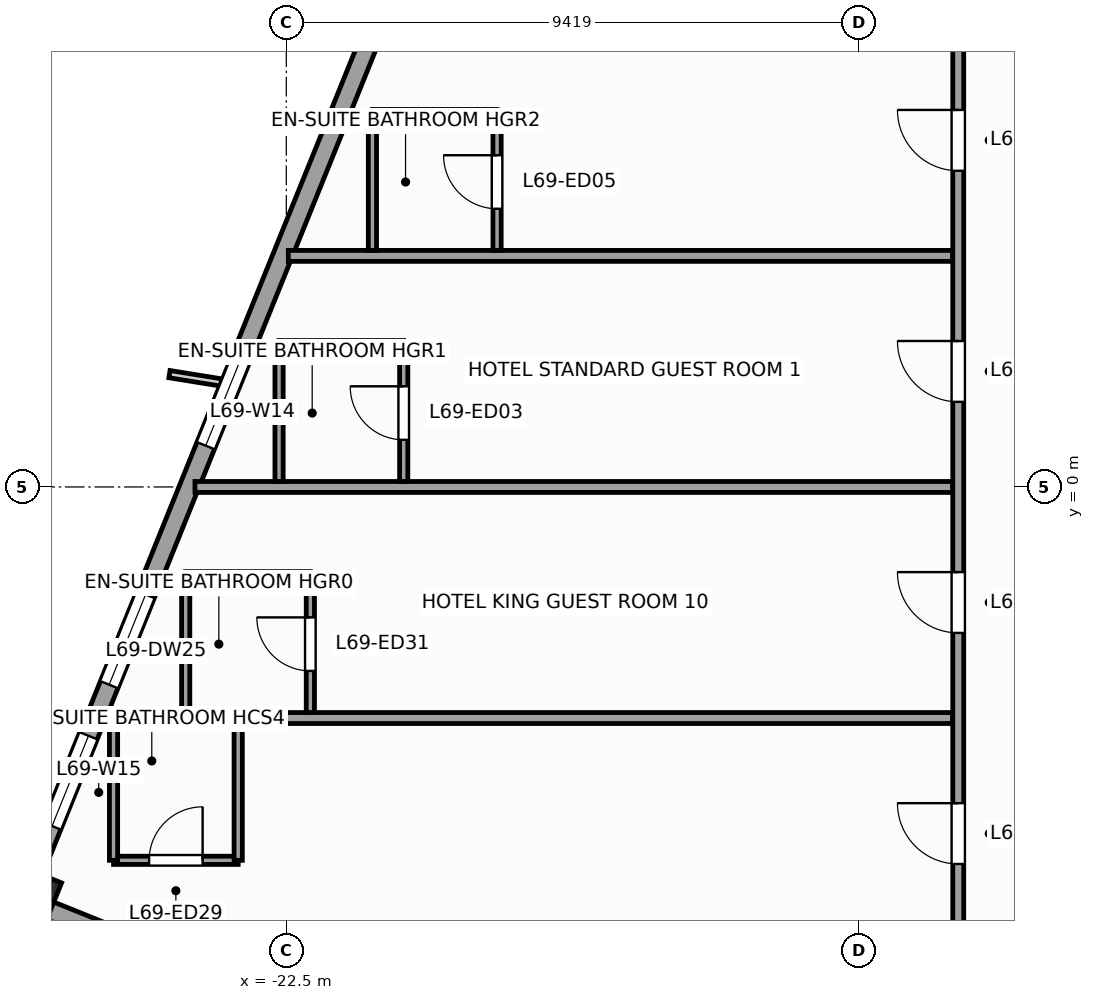
"""IFC4 building model, lengths in metres.
Left out: names, types, materials, properties, quantities, classifications, styles, units other than length and angle.
Written with IfcOpenShell. Run it as: python <this file> out.ifc"""

import sys

from ifc_helpers import new_model, si_unit, direction, frame, frame_2d, origin, origin_2d, place, context, subcontext, project, spatial, rectangle, extrude, source, transform, mapped, element, fill, save


model = new_model("IFC4")
c1 = context("Model", 3, precision=1e-05, world=origin(), true_north=direction((0.0, 1.0)))
c2 = subcontext(c1, "Body", "Model", "MODEL_VIEW")
j1 = project(units=[si_unit("LENGTHUNIT", "METRE"), si_unit("PLANEANGLEUNIT", "RADIAN")], contexts=[c1])
p1 = place(None, origin())
s1 = spatial("IfcSite", under=j1, at=p1, CompositionType="ELEMENT")
p2 = place(p1, origin())
s2 = spatial("IfcBuilding", under=s1, at=p2, CompositionType="ELEMENT")
p3 = place(p2, frame((0.0, 0.0, 283.2)))
s3 = spatial("IfcBuildingStorey", under=s2, at=p3, CompositionType="ELEMENT", Elevation=283.2)
m1 = source(origin(), c2, "Body", "SweptSolid", [
    extrude(rectangle(XDim=0.65, YDim=0.65, at=origin_2d()), origin(), (0.0, 0.0, 1.0), 3.6),
])
p4 = place(p3, frame((-26.62, -6.69, 0.0), z_axis=(0.0, 0.0, 1.0), x_axis=(0.374606593416, 0.927183854567, 0.0)))
e1 = element("IfcColumn", 1, at=p4, inside=s3, PredefinedType="COLUMN", context=c2, shape_type="MappedRepresentation", body=[
    mapped(m1, transform((0.0, 0.0, 0.0), scale=1.0)),
])
p5 = place(p3, frame((-14.479, 23.813, 0.0), z_axis=(0.0, 0.0, 1.0), x_axis=(-0.374609557019, -0.927182657188, 0.0)))
e2 = element("IfcWall", 2, at=p5, inside=s3, PredefinedType="STANDARD", context=c2, shape_type="SweptSolid", body=[
    extrude(rectangle(XDim=33.31, YDim=0.31, at=frame_2d((16.655, 0.0))), origin(), (0.0, 0.0, 1.0), 2.75),
])
p6 = place(p5, frame((10.53, 0.0, 0.0)))
e3 = element("IfcOpeningElement", 3, at=p6, cuts=e2, PredefinedType="OPENING", context=c2, shape_type="SweptSolid", body=[
    extrude(rectangle(XDim=1.05, YDim=2.25, at=frame_2d((0.525, 1.125))), frame((0.0, 0.165, 0.0), z_axis=(0.0, -1.0, 0.0), x_axis=(1.0, 0.0, 0.0)), (0.0, 0.0, 1.0), 0.33),
])
p7 = place(p5, frame((3.197, 0.0, 0.47)))
e4 = element("IfcOpeningElement", 4, at=p7, cuts=e2, PredefinedType="OPENING", context=c2, shape_type="SweptSolid", body=[
    extrude(rectangle(XDim=1.6, YDim=2.1, at=frame_2d((0.8, 1.05))), frame((0.0, 0.165, 0.0), z_axis=(0.0, -1.0, 0.0), x_axis=(1.0, 0.0, 0.0)), (0.0, 0.0, 1.0), 0.33),
])
p8 = place(p5, frame((7.36, 0.0, 0.47)))
e5 = element("IfcOpeningElement", 5, at=p8, cuts=e2, PredefinedType="OPENING", context=c2, shape_type="SweptSolid", body=[
    extrude(rectangle(XDim=1.6, YDim=2.1, at=frame_2d((0.8, 1.05))), frame((0.0, 0.165, 0.0), z_axis=(0.0, -1.0, 0.0), x_axis=(1.0, 0.0, 0.0)), (0.0, 0.0, 1.0), 0.33),
])
p9 = place(p5, frame((14.439, 0.0, 0.47)))
e6 = element("IfcOpeningElement", 6, at=p9, cuts=e2, PredefinedType="OPENING", context=c2, shape_type="SweptSolid", body=[
    extrude(rectangle(XDim=1.6, YDim=2.1, at=frame_2d((0.8, 1.05))), frame((0.0, 0.165, 0.0), z_axis=(0.0, -1.0, 0.0), x_axis=(1.0, 0.0, 0.0)), (0.0, 0.0, 1.0), 0.33),
])
p10 = place(p5, frame((23.351, 0.0, 0.47)))
e7 = element("IfcOpeningElement", 7, at=p10, cuts=e2, PredefinedType="OPENING", context=c2, shape_type="SweptSolid", body=[
    extrude(rectangle(XDim=1.6, YDim=2.1, at=frame_2d((0.8, 1.05))), frame((0.0, 0.165, 0.0), z_axis=(0.0, -1.0, 0.0), x_axis=(1.0, 0.0, 0.0)), (0.0, 0.0, 1.0), 0.33),
])
p11 = place(p5, frame((30.097, 0.0, 0.47)))
e8 = element("IfcOpeningElement", 8, at=p11, cuts=e2, PredefinedType="OPENING", context=c2, shape_type="SweptSolid", body=[
    extrude(rectangle(XDim=1.6, YDim=2.1, at=frame_2d((0.8, 1.05))), frame((0.0, 0.165, 0.0), z_axis=(0.0, -1.0, 0.0), x_axis=(1.0, 0.0, 0.0)), (0.0, 0.0, 1.0), 0.33),
])
p12 = place(p5, frame((27.59, 0.0, 0.47)))
e9 = element("IfcOpeningElement", 9, at=p12, cuts=e2, PredefinedType="OPENING", context=c2, shape_type="SweptSolid", body=[
    extrude(rectangle(XDim=1.6, YDim=2.1, at=frame_2d((0.8, 1.05))), frame((0.0, 0.165, 0.0), z_axis=(0.0, -1.0, 0.0), x_axis=(1.0, 0.0, 0.0)), (0.0, 0.0, 1.0), 0.33),
])
p13 = place(p3, frame((-26.841, -6.784, 0.0), z_axis=(0.0, 0.0, 1.0), x_axis=(0.927171722085, -0.374636620962, 0.0)))
e10 = element("IfcWall", 10, at=p13, inside=s3, PredefinedType="STANDARD", context=c2, shape_type="SweptSolid", body=[
    extrude(rectangle(XDim=6.0, YDim=0.31, at=frame_2d((3.0, 0.0))), origin(), (0.0, 0.0, 1.0), 2.65),
])
p14 = place(p3, frame((-11.45, -12.35, 0.0), z_axis=(0.0, 0.0, 1.0), x_axis=(0.0, 1.0, 0.0)))
e11 = element("IfcWall", 11, at=p14, inside=s3, PredefinedType="PARTITIONING", context=c2, shape_type="SweptSolid", body=[
    extrude(rectangle(XDim=23.7, YDim=0.18, at=frame_2d((11.85, 0.0))), origin(), (0.0, 0.0, 1.0), 3.35),
])
p15 = place(p14, frame((13.75, 0.0, 0.0)))
e12 = element("IfcOpeningElement", 12, at=p15, cuts=e11, PredefinedType="OPENING", context=c2, shape_type="SweptSolid", body=[
    extrude(rectangle(XDim=1.0, YDim=2.15, at=frame_2d((0.5, 1.075))), frame((0.0, 0.1, 0.0), z_axis=(0.0, -1.0, 0.0), x_axis=(1.0, 0.0, 0.0)), (0.0, 0.0, 1.0), 0.2),
])
p16 = place(p14, frame((17.55, 0.0, 0.0)))
e13 = element("IfcOpeningElement", 13, at=p16, cuts=e11, PredefinedType="OPENING", context=c2, shape_type="SweptSolid", body=[
    extrude(rectangle(XDim=1.0, YDim=2.15, at=frame_2d((0.5, 1.075))), frame((0.0, 0.1, 0.0), z_axis=(0.0, -1.0, 0.0), x_axis=(1.0, 0.0, 0.0)), (0.0, 0.0, 1.0), 0.2),
])
p17 = place(p14, frame((6.15, 0.0, 0.0)))
e14 = element("IfcOpeningElement", 14, at=p17, cuts=e11, PredefinedType="OPENING", context=c2, shape_type="SweptSolid", body=[
    extrude(rectangle(XDim=1.0, YDim=2.15, at=frame_2d((0.5, 1.075))), frame((0.0, 0.1, 0.0), z_axis=(0.0, -1.0, 0.0), x_axis=(1.0, 0.0, 0.0)), (0.0, 0.0, 1.0), 0.2),
])
p18 = place(p14, frame((9.95, 0.0, 0.0)))
e15 = element("IfcOpeningElement", 15, at=p18, cuts=e11, PredefinedType="OPENING", context=c2, shape_type="SweptSolid", body=[
    extrude(rectangle(XDim=1.0, YDim=2.15, at=frame_2d((0.5, 1.075))), frame((0.0, 0.1, 0.0), z_axis=(0.0, -1.0, 0.0), x_axis=(1.0, 0.0, 0.0)), (0.0, 0.0, 1.0), 0.2),
])
p19 = place(p3, frame((-11.545, -3.8, 0.0), z_axis=(0.0, 0.0, 1.0), x_axis=(-1.0, 0.0, 0.0)))
e16 = element("IfcWall", 16, at=p19, inside=s3, PredefinedType="PARTITIONING", context=c2, shape_type="SweptSolid", body=[
    extrude(rectangle(XDim=13.993, YDim=0.18, at=frame_2d((6.997, 0.0))), origin(), (0.0, 0.0, 1.0), 3.35),
])
p20 = place(p3, frame((-11.545, 0.0, 0.0), z_axis=(0.0, 0.0, 1.0), x_axis=(-1.0, 0.0, 0.0)))
e17 = element("IfcWall", 17, at=p20, inside=s3, PredefinedType="PARTITIONING", context=c2, shape_type="SweptSolid", body=[
    extrude(rectangle(XDim=12.458, YDim=0.18, at=frame_2d((6.229, 0.0))), origin(), (0.0, 0.0, 1.0), 3.35),
])
p21 = place(p3, frame((-11.545, 3.8, 0.0), z_axis=(0.0, 0.0, 1.0), x_axis=(-1.0, 0.0, 0.0)))
e18 = element("IfcWall", 18, at=p21, inside=s3, PredefinedType="PARTITIONING", context=c2, shape_type="SweptSolid", body=[
    extrude(rectangle(XDim=10.923, YDim=0.18, at=frame_2d((5.461, 0.0))), origin(), (0.0, 0.0, 1.0), 3.35),
])
p22 = place(p3, frame((-20.57, 0.09, 0.0), z_axis=(0.0, 0.0, 1.0), x_axis=(0.0, 1.0, 0.0)))
e19 = element("IfcWall", 19, at=p22, inside=s3, PredefinedType="PARTITIONING", context=c2, shape_type="SweptSolid", body=[
    extrude(rectangle(XDim=2.25, YDim=0.135, at=frame_2d((1.125, 0.0))), origin(), (0.0, 0.0, 1.0), 3.35),
])
p23 = place(p22, frame((0.685, 0.0, 0.0)))
e20 = element("IfcOpeningElement", 20, at=p23, cuts=e19, PredefinedType="OPENING", context=c2, shape_type="SweptSolid", body=[
    extrude(rectangle(XDim=0.88, YDim=2.1, at=frame_2d((0.44, 1.05))), frame((0.0, 0.078, 0.0), z_axis=(0.0, -1.0, 0.0), x_axis=(1.0, 0.0, 0.0)), (0.0, 0.0, 1.0), 0.155),
])
p24 = place(p3, frame((-22.619, 2.34, 0.0), z_axis=(0.0, 0.0, 1.0), x_axis=(1.0, 0.0, 0.0)))
e21 = element("IfcWall", 21, at=p24, inside=s3, PredefinedType="PARTITIONING", context=c2, shape_type="SweptSolid", body=[
    extrude(rectangle(XDim=2.05, YDim=0.135, at=frame_2d((1.025, 0.0))), origin(), (0.0, 0.0, 1.0), 3.35),
])
p25 = place(p3, frame((-22.619, 0.09, 0.0), z_axis=(0.0, 0.0, 1.0), x_axis=(0.0, 1.0, 0.0)))
e22 = element("IfcWall", 22, at=p25, inside=s3, PredefinedType="PARTITIONING", context=c2, shape_type="SweptSolid", body=[
    extrude(rectangle(XDim=2.25, YDim=0.135, at=frame_2d((1.125, 0.0))), origin(), (0.0, 0.0, 1.0), 3.35),
])
p26 = place(p3, frame((-19.034, 3.89, 0.0), z_axis=(0.0, 0.0, 1.0), x_axis=(0.0, 1.0, 0.0)))
e23 = element("IfcWall", 23, at=p26, inside=s3, PredefinedType="PARTITIONING", context=c2, shape_type="SweptSolid", body=[
    extrude(rectangle(XDim=2.25, YDim=0.135, at=frame_2d((1.125, 0.0))), origin(), (0.0, 0.0, 1.0), 3.35),
])
p27 = place(p26, frame((0.685, 0.0, 0.0)))
e24 = element("IfcOpeningElement", 24, at=p27, cuts=e23, PredefinedType="OPENING", context=c2, shape_type="SweptSolid", body=[
    extrude(rectangle(XDim=0.88, YDim=2.1, at=frame_2d((0.44, 1.05))), frame((0.0, 0.078, 0.0), z_axis=(0.0, -1.0, 0.0), x_axis=(1.0, 0.0, 0.0)), (0.0, 0.0, 1.0), 0.155),
])
p28 = place(p3, frame((-21.084, 6.14, 0.0), z_axis=(0.0, 0.0, 1.0), x_axis=(1.0, 0.0, 0.0)))
e25 = element("IfcWall", 25, at=p28, inside=s3, PredefinedType="PARTITIONING", context=c2, shape_type="SweptSolid", body=[
    extrude(rectangle(XDim=2.05, YDim=0.135, at=frame_2d((1.025, 0.0))), origin(), (0.0, 0.0, 1.0), 3.35),
])
p29 = place(p3, frame((-21.084, 3.89, 0.0), z_axis=(0.0, 0.0, 1.0), x_axis=(0.0, 1.0, 0.0)))
e26 = element("IfcWall", 26, at=p29, inside=s3, PredefinedType="PARTITIONING", context=c2, shape_type="SweptSolid", body=[
    extrude(rectangle(XDim=2.25, YDim=0.135, at=frame_2d((1.125, 0.0))), origin(), (0.0, 0.0, 1.0), 3.35),
])
p30 = place(p3, frame((-25.342, -6.14, 0.0), z_axis=(0.0, 0.0, 1.0), x_axis=(1.0, 0.0, 0.0)))
e27 = element("IfcWall", 27, at=p30, inside=s3, PredefinedType="PARTITIONING", context=c2, shape_type="SweptSolid", body=[
    extrude(rectangle(XDim=2.05, YDim=0.135, at=frame_2d((1.025, 0.0))), origin(), (0.0, 0.0, 1.0), 3.35),
])
p31 = place(p30, frame((0.585, 0.0, 0.0)))
e28 = element("IfcOpeningElement", 28, at=p31, cuts=e27, PredefinedType="OPENING", context=c2, shape_type="SweptSolid", body=[
    extrude(rectangle(XDim=0.88, YDim=2.1, at=frame_2d((0.44, 1.05))), frame((0.0, 0.078, 0.0), z_axis=(0.0, -1.0, 0.0), x_axis=(1.0, 0.0, 0.0)), (0.0, 0.0, 1.0), 0.155),
])
p32 = place(p3, frame((-23.292, -6.14, 0.0), z_axis=(0.0, 0.0, 1.0), x_axis=(0.0, 1.0, 0.0)))
e29 = element("IfcWall", 29, at=p32, inside=s3, PredefinedType="PARTITIONING", context=c2, shape_type="SweptSolid", body=[
    extrude(rectangle(XDim=2.25, YDim=0.135, at=frame_2d((1.125, 0.0))), origin(), (0.0, 0.0, 1.0), 2.95),
])
p33 = place(p3, frame((-25.342, -6.14, 0.0), z_axis=(0.0, 0.0, 1.0), x_axis=(0.0, 1.0, 0.0)))
e30 = element("IfcWall", 30, at=p33, inside=s3, PredefinedType="PARTITIONING", context=c2, shape_type="SweptSolid", body=[
    extrude(rectangle(XDim=2.25, YDim=0.135, at=frame_2d((1.125, 0.0))), origin(), (0.0, 0.0, 1.0), 2.75),
])
p34 = place(p3, frame((-22.105, -3.71, 0.0), z_axis=(0.0, 0.0, 1.0), x_axis=(0.0, 1.0, 0.0)))
e31 = element("IfcWall", 31, at=p34, inside=s3, PredefinedType="PARTITIONING", context=c2, shape_type="SweptSolid", body=[
    extrude(rectangle(XDim=2.25, YDim=0.135, at=frame_2d((1.125, 0.0))), origin(), (0.0, 0.0, 1.0), 3.35),
])
p35 = place(p34, frame((0.685, 0.0, 0.0)))
e32 = element("IfcOpeningElement", 32, at=p35, cuts=e31, PredefinedType="OPENING", context=c2, shape_type="SweptSolid", body=[
    extrude(rectangle(XDim=0.88, YDim=2.1, at=frame_2d((0.44, 1.05))), frame((0.0, 0.078, 0.0), z_axis=(0.0, -1.0, 0.0), x_axis=(1.0, 0.0, 0.0)), (0.0, 0.0, 1.0), 0.155),
])
p36 = place(p3, frame((-24.155, -1.46, 0.0), z_axis=(0.0, 0.0, 1.0), x_axis=(1.0, 0.0, 0.0)))
e33 = element("IfcWall", 33, at=p36, inside=s3, PredefinedType="PARTITIONING", context=c2, shape_type="SweptSolid", body=[
    extrude(rectangle(XDim=2.05, YDim=0.135, at=frame_2d((1.025, 0.0))), origin(), (0.0, 0.0, 1.0), 3.35),
])
p37 = place(p3, frame((-24.155, -3.71, 0.0), z_axis=(0.0, 0.0, 1.0), x_axis=(0.0, 1.0, 0.0)))
e34 = element("IfcWall", 34, at=p37, inside=s3, PredefinedType="PARTITIONING", context=c2, shape_type="SweptSolid", body=[
    extrude(rectangle(XDim=2.25, YDim=0.135, at=frame_2d((1.125, 0.0))), origin(), (0.0, 0.0, 1.0), 3.35),
])
m2 = source(origin(), c2, "Body", "SweptSolid", [
    extrude(rectangle(XDim=1.6, YDim=2.1, at=frame_2d((0.8, 1.05))), frame((0.0, 0.03, 0.0), z_axis=(0.0, -1.0, 0.0), x_axis=(1.0, 0.0, 0.0)), (0.0, 0.0, 1.0), 0.06),
])
p38 = place(p10, origin())
e35 = element("IfcWindow", 35, at=p38, inside=s3, PartitioningType="SINGLE_PANEL", PredefinedType="WINDOW", context=c2, shape_type="MappedRepresentation", body=[
    mapped(m2, transform((0.0, 0.0, 0.0), scale=1.0)),
])
fill(e7, e35)
p39 = place(p11, origin())
e36 = element("IfcWindow", 36, at=p39, inside=s3, PartitioningType="SINGLE_PANEL", PredefinedType="WINDOW", context=c2, shape_type="MappedRepresentation", body=[
    mapped(m2, transform((0.0, 0.0, 0.0), scale=1.0)),
])
fill(e8, e36)
m3 = source(origin(), c2, "Body", "SweptSolid", [
    extrude(rectangle(XDim=1.0, YDim=2.15, at=frame_2d((0.5, 1.075))), frame((0.0, 0.025, 0.0), z_axis=(0.0, -1.0, 0.0), x_axis=(1.0, 0.0, 0.0)), (0.0, 0.0, 1.0), 0.05),
])
p40 = place(p15, origin())
e37 = element("IfcDoor", 37, at=p40, inside=s3, OperationType="SINGLE_SWING_RIGHT", PredefinedType="DOOR", context=c2, shape_type="MappedRepresentation", body=[
    mapped(m3, transform((0.0, 0.0, 0.0), scale=1.0)),
])
fill(e12, e37)
m4 = source(origin(), c2, "Body", "SweptSolid", [
    extrude(rectangle(XDim=0.88, YDim=2.1, at=frame_2d((0.44, 1.05))), frame((0.0, 0.025, 0.0), z_axis=(0.0, -1.0, 0.0), x_axis=(1.0, 0.0, 0.0)), (0.0, 0.0, 1.0), 0.05),
])
p41 = place(p23, origin())
e38 = element("IfcDoor", 38, at=p41, inside=s3, OperationType="SINGLE_SWING_RIGHT", PredefinedType="DOOR", context=c2, shape_type="MappedRepresentation", body=[
    mapped(m4, transform((0.0, 0.0, 0.0), scale=1.0)),
])
fill(e20, e38)
p42 = place(p16, origin())
e39 = element("IfcDoor", 39, at=p42, inside=s3, OperationType="SINGLE_SWING_RIGHT", PredefinedType="DOOR", context=c2, shape_type="MappedRepresentation", body=[
    mapped(m3, transform((0.0, 0.0, 0.0), scale=1.0)),
])
fill(e13, e39)
p43 = place(p27, origin())
e40 = element("IfcDoor", 40, at=p43, inside=s3, OperationType="SINGLE_SWING_RIGHT", PredefinedType="DOOR", context=c2, shape_type="MappedRepresentation", body=[
    mapped(m4, transform((0.0, 0.0, 0.0), scale=1.0)),
])
fill(e24, e40)
p44 = place(p17, origin())
e41 = element("IfcDoor", 41, at=p44, inside=s3, OperationType="SINGLE_SWING_RIGHT", PredefinedType="DOOR", context=c2, shape_type="MappedRepresentation", body=[
    mapped(m3, transform((0.0, 0.0, 0.0), scale=1.0)),
])
fill(e14, e41)
p45 = place(p31, origin())
e42 = element("IfcDoor", 42, at=p45, inside=s3, OperationType="SINGLE_SWING_RIGHT", PredefinedType="DOOR", context=c2, shape_type="MappedRepresentation", body=[
    mapped(m4, transform((0.0, 0.0, 0.0), scale=1.0)),
])
fill(e28, e42)
p46 = place(p18, origin())
e43 = element("IfcDoor", 43, at=p46, inside=s3, OperationType="SINGLE_SWING_RIGHT", PredefinedType="DOOR", context=c2, shape_type="MappedRepresentation", body=[
    mapped(m3, transform((0.0, 0.0, 0.0), scale=1.0)),
])
fill(e15, e43)
p47 = place(p35, origin())
e44 = element("IfcDoor", 44, at=p47, inside=s3, OperationType="SINGLE_SWING_RIGHT", PredefinedType="DOOR", context=c2, shape_type="MappedRepresentation", body=[
    mapped(m4, transform((0.0, 0.0, 0.0), scale=1.0)),
])
fill(e32, e44)
p48 = place(p12, origin())
e45 = element("IfcWindow", 45, at=p48, inside=s3, PartitioningType="SINGLE_PANEL", PredefinedType="WINDOW", context=c2, shape_type="MappedRepresentation", body=[
    mapped(m2, transform((0.0, 0.0, 0.0), scale=1.0)),
])
fill(e9, e45)
save(model, sys.argv[1])
